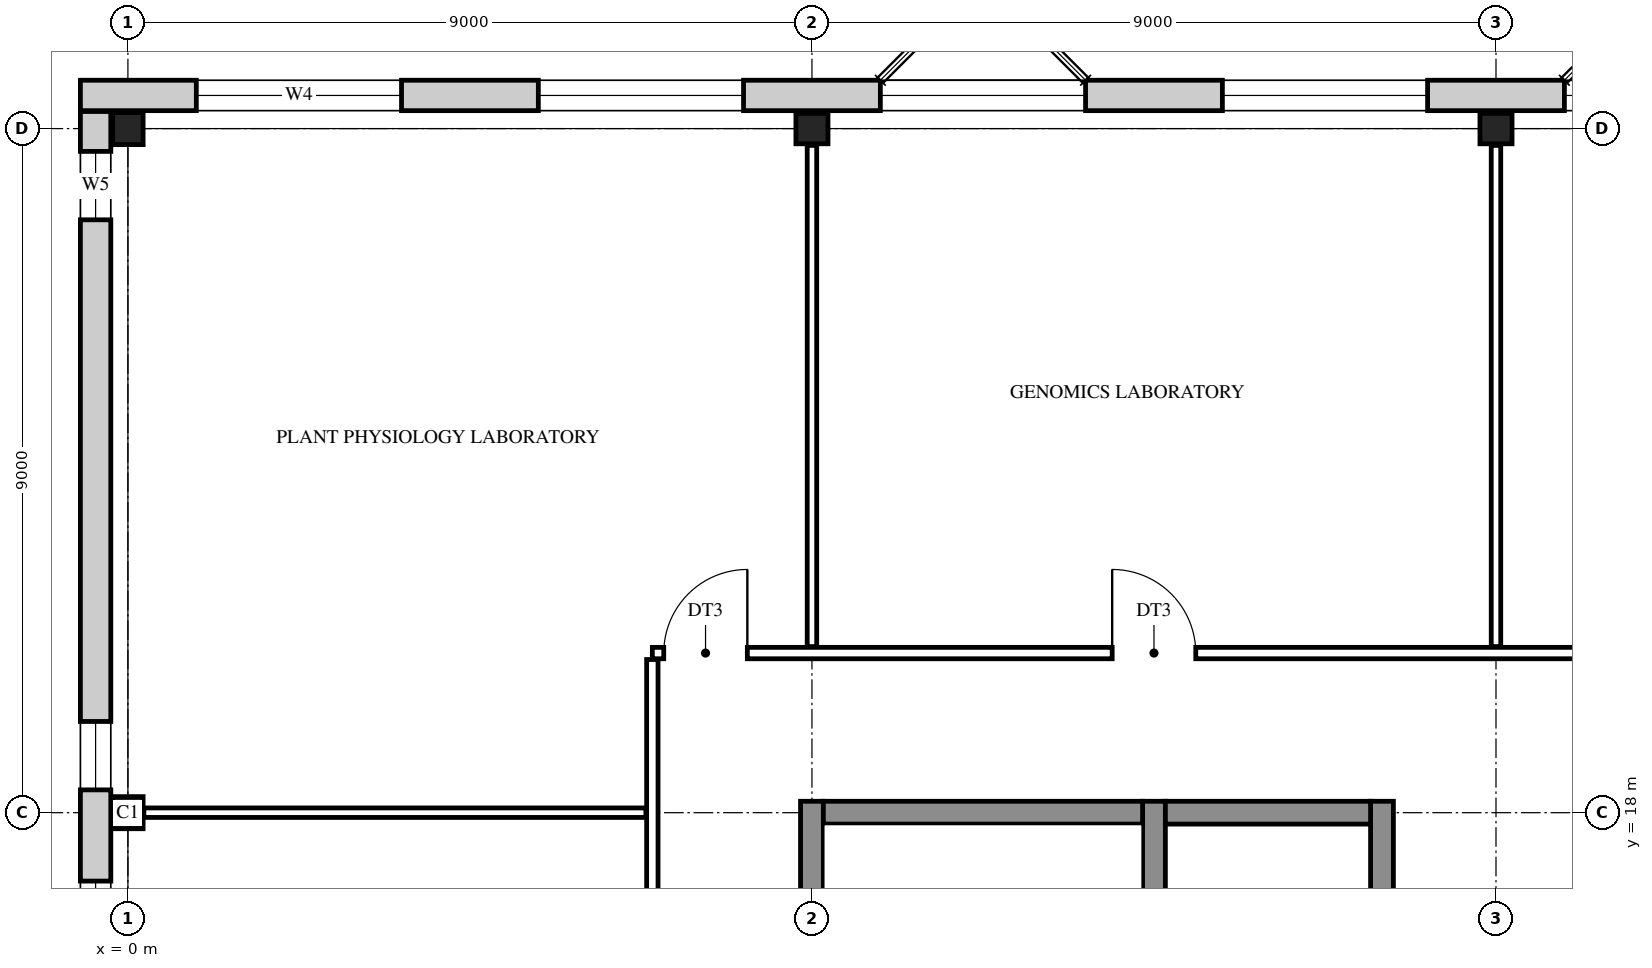
"""IFC4 building model, lengths in metres.
Left out: names, types, materials, properties, quantities, classifications, styles, units other than length and angle.
Written with IfcOpenShell. Run it as: python <this file> out.ifc"""

import sys

from ifc_helpers import new_model, si_unit, direction, frame, frame_2d, origin, origin_2d, place, context, subcontext, project, spatial, rectangle, i_section, extrude, element, fill, save


model = new_model("IFC4")
c1 = context("Model", 3, precision=1e-05, world=origin(), true_north=direction((0.0, 1.0)))
c2 = subcontext(c1, "Body", "Model", "MODEL_VIEW")
j1 = project(units=[si_unit("LENGTHUNIT", "METRE"), si_unit("PLANEANGLEUNIT", "RADIAN")], contexts=[c1])
p1 = place(None, origin())
s1 = spatial("IfcSite", under=j1, at=p1, CompositionType="ELEMENT")
p2 = place(p1, origin())
s2 = spatial("IfcBuilding", under=s1, at=p2, CompositionType="ELEMENT")
p3 = place(p2, frame((0.0, 0.0, 15.0)))
s3 = spatial("IfcBuildingStorey", under=s2, at=p3, CompositionType="ELEMENT", Elevation=15.0)
for number, where, z_axis, x_axis in (
    (1, (0.0, 18.0, 0.0), (0.0, 0.0, 1.0), (1.0, 0.0, 0.0)),
    (2, (0.0, 27.0, 0.0), (0.0, 0.0, 1.0), (1.0, 0.0, 0.0)),
    (3, (9.0, 27.0, 0.0), (0.0, 0.0, 1.0), (0.0, 1.0, 0.0)),
    (4, (18.0, 27.0, 0.0), (0.0, 0.0, 1.0), (0.0, 1.0, 0.0)),
):
    element("IfcColumn", number, at=place(p3, frame(where, z_axis=z_axis, x_axis=x_axis)), inside=s3, PredefinedType="COLUMN", context=c2, shape_type="SweptSolid", body=[
        extrude(i_section(OverallWidth=0.4, OverallDepth=0.422, WebThickness=0.028, FlangeThickness=0.036, at=origin_2d()), origin(), (0.0, 0.0, 1.0), 4.2),
    ])
for number, where, z_axis, x_axis in (
    (5, (9.0, 8.85, 0.0), (0.0, 0.0, 1.0), (0.0, 1.0, 0.0)),
    (6, (13.5, 8.85, 0.0), (0.0, 0.0, 1.0), (0.0, 1.0, 0.0)),
):
    element("IfcWall", number, at=place(p3, frame(where, z_axis=z_axis, x_axis=x_axis)), inside=s3, PredefinedType="SHEAR", context=c2, shape_type="SweptSolid", body=[
        extrude(rectangle(XDim=9.3, YDim=0.3, at=frame_2d((4.65, 0.0))), origin(), (0.0, 0.0, 1.0), 4.2),
    ])
p4 = place(p3, frame((16.5, 8.85, 0.0), z_axis=(0.0, 0.0, 1.0), x_axis=(0.0, 1.0, 0.0)))
e7 = element("IfcWall", 7, at=p4, inside=s3, PredefinedType="SHEAR", context=c2, shape_type="SweptSolid", body=[
    extrude(rectangle(XDim=9.3, YDim=0.3, at=frame_2d((4.65, 0.0))), origin(), (0.0, 0.0, 1.0), 4.2),
])
p5 = place(p4, frame((1.1, 0.0, 0.0)))
e8 = element("IfcOpeningElement", 8, at=p5, cuts=e7, PredefinedType="OPENING", context=c2, shape_type="SweptSolid", body=[
    extrude(rectangle(XDim=1.1, YDim=2.1, at=frame_2d((0.55, 1.05))), frame((0.0, 0.16, 0.0), z_axis=(0.0, -1.0, 0.0), x_axis=(1.0, 0.0, 0.0)), (0.0, 0.0, 1.0), 0.32),
])
p6 = place(p4, frame((4.1, 0.0, 0.0)))
e9 = element("IfcOpeningElement", 9, at=p6, cuts=e7, PredefinedType="OPENING", context=c2, shape_type="SweptSolid", body=[
    extrude(rectangle(XDim=1.1, YDim=2.1, at=frame_2d((0.55, 1.05))), frame((0.0, 0.16, 0.0), z_axis=(0.0, -1.0, 0.0), x_axis=(1.0, 0.0, 0.0)), (0.0, 0.0, 1.0), 0.32),
])
p7 = place(p3, frame((9.15, 18.0, 0.0), z_axis=(0.0, 0.0, 1.0), x_axis=(1.0, 0.0, 0.0)))
e10 = element("IfcWall", 10, at=p7, inside=s3, PredefinedType="SHEAR", context=c2, shape_type="SweptSolid", body=[
    extrude(rectangle(XDim=4.2, YDim=0.3, at=frame_2d((2.1, 0.0))), origin(), (0.0, 0.0, 1.0), 4.2),
])
p8 = place(p3, frame((13.65, 18.0, 0.0), z_axis=(0.0, 0.0, 1.0), x_axis=(1.0, 0.0, 0.0)))
e11 = element("IfcWall", 11, at=p8, inside=s3, PredefinedType="SHEAR", context=c2, shape_type="SweptSolid", body=[
    extrude(rectangle(XDim=2.7, YDim=0.3, at=frame_2d((1.35, 0.0))), origin(), (0.0, 0.0, 1.0), 4.2),
])
p9 = place(p3, frame((-0.425, -0.225, 0.0), z_axis=(0.0, 0.0, 1.0), x_axis=(0.0, 1.0, 0.0)))
e12 = element("IfcWall", 12, at=p9, inside=s3, PredefinedType="STANDARD", context=c2, shape_type="SweptSolid", body=[
    extrude(rectangle(XDim=27.45, YDim=0.4, at=frame_2d((13.725, 0.0))), origin(), (0.0, 0.0, 1.0), 4.2),
])
p10 = place(p9, frame((0.525, 0.0, 0.9)))
e13 = element("IfcOpeningElement", 13, at=p10, cuts=e12, PredefinedType="OPENING", context=c2, shape_type="SweptSolid", body=[
    extrude(rectangle(XDim=0.9, YDim=2.0, at=frame_2d((0.45, 1.0))), frame((0.0, 0.21, 0.0), z_axis=(0.0, -1.0, 0.0), x_axis=(1.0, 0.0, 0.0)), (0.0, 0.0, 1.0), 0.42),
])
p11 = place(p9, frame((8.025, 0.0, 0.9)))
e14 = element("IfcOpeningElement", 14, at=p11, cuts=e12, PredefinedType="OPENING", context=c2, shape_type="SweptSolid", body=[
    extrude(rectangle(XDim=0.9, YDim=2.0, at=frame_2d((0.45, 1.0))), frame((0.0, 0.21, 0.0), z_axis=(0.0, -1.0, 0.0), x_axis=(1.0, 0.0, 0.0)), (0.0, 0.0, 1.0), 0.42),
])
p12 = place(p9, frame((10.125, 0.0, 0.9)))
e15 = element("IfcOpeningElement", 15, at=p12, cuts=e12, PredefinedType="OPENING", context=c2, shape_type="SweptSolid", body=[
    extrude(rectangle(XDim=2.7, YDim=2.5, at=frame_2d((1.35, 1.25))), frame((0.0, 0.21, 0.0), z_axis=(0.0, -1.0, 0.0), x_axis=(1.0, 0.0, 0.0)), (0.0, 0.0, 1.0), 0.42),
])
p13 = place(p9, frame((14.625, 0.0, 0.9)))
e16 = element("IfcOpeningElement", 16, at=p13, cuts=e12, PredefinedType="OPENING", context=c2, shape_type="SweptSolid", body=[
    extrude(rectangle(XDim=2.7, YDim=2.5, at=frame_2d((1.35, 1.25))), frame((0.0, 0.21, 0.0), z_axis=(0.0, -1.0, 0.0), x_axis=(1.0, 0.0, 0.0)), (0.0, 0.0, 1.0), 0.42),
])
p14 = place(p9, frame((18.525, 0.0, 0.9)))
e17 = element("IfcOpeningElement", 17, at=p14, cuts=e12, PredefinedType="OPENING", context=c2, shape_type="SweptSolid", body=[
    extrude(rectangle(XDim=0.9, YDim=2.0, at=frame_2d((0.45, 1.0))), frame((0.0, 0.21, 0.0), z_axis=(0.0, -1.0, 0.0), x_axis=(1.0, 0.0, 0.0)), (0.0, 0.0, 1.0), 0.42),
])
p15 = place(p9, frame((26.025, 0.0, 0.9)))
e18 = element("IfcOpeningElement", 18, at=p15, cuts=e12, PredefinedType="OPENING", context=c2, shape_type="SweptSolid", body=[
    extrude(rectangle(XDim=0.9, YDim=2.0, at=frame_2d((0.45, 1.0))), frame((0.0, 0.21, 0.0), z_axis=(0.0, -1.0, 0.0), x_axis=(1.0, 0.0, 0.0)), (0.0, 0.0, 1.0), 0.42),
])
p16 = place(p3, frame((-0.625, 27.436, 0.0), z_axis=(0.0, 0.0, 1.0), x_axis=(1.0, 0.0, 0.0)))
e19 = element("IfcWall", 19, at=p16, inside=s3, PredefinedType="STANDARD", context=c2, shape_type="SweptSolid", body=[
    extrude(rectangle(XDim=32.75, YDim=0.4, at=frame_2d((16.375, 0.0))), origin(), (0.0, 0.0, 1.0), 4.2),
])
p17 = place(p16, frame((1.525, 0.0, 0.9)))
e20 = element("IfcOpeningElement", 20, at=p17, cuts=e19, PredefinedType="OPENING", context=c2, shape_type="SweptSolid", body=[
    extrude(rectangle(XDim=2.7, YDim=2.5, at=frame_2d((1.35, 1.25))), frame((0.0, 0.21, 0.0), z_axis=(0.0, -1.0, 0.0), x_axis=(1.0, 0.0, 0.0)), (0.0, 0.0, 1.0), 0.42),
])
p18 = place(p16, frame((6.025, 0.0, 0.9)))
e21 = element("IfcOpeningElement", 21, at=p18, cuts=e19, PredefinedType="OPENING", context=c2, shape_type="SweptSolid", body=[
    extrude(rectangle(XDim=2.7, YDim=2.5, at=frame_2d((1.35, 1.25))), frame((0.0, 0.21, 0.0), z_axis=(0.0, -1.0, 0.0), x_axis=(1.0, 0.0, 0.0)), (0.0, 0.0, 1.0), 0.42),
])
p19 = place(p16, frame((10.525, 0.0, 0.9)))
e22 = element("IfcOpeningElement", 22, at=p19, cuts=e19, PredefinedType="OPENING", context=c2, shape_type="SweptSolid", body=[
    extrude(rectangle(XDim=2.7, YDim=2.5, at=frame_2d((1.35, 1.25))), frame((0.0, 0.21, 0.0), z_axis=(0.0, -1.0, 0.0), x_axis=(1.0, 0.0, 0.0)), (0.0, 0.0, 1.0), 0.42),
])
p20 = place(p16, frame((15.025, 0.0, 0.9)))
e23 = element("IfcOpeningElement", 23, at=p20, cuts=e19, PredefinedType="OPENING", context=c2, shape_type="SweptSolid", body=[
    extrude(rectangle(XDim=2.7, YDim=2.5, at=frame_2d((1.35, 1.25))), frame((0.0, 0.21, 0.0), z_axis=(0.0, -1.0, 0.0), x_axis=(1.0, 0.0, 0.0)), (0.0, 0.0, 1.0), 0.42),
])
p21 = place(p16, frame((19.525, 0.0, 0.9)))
e24 = element("IfcOpeningElement", 24, at=p21, cuts=e19, PredefinedType="OPENING", context=c2, shape_type="SweptSolid", body=[
    extrude(rectangle(XDim=2.7, YDim=2.5, at=frame_2d((1.35, 1.25))), frame((0.0, 0.21, 0.0), z_axis=(0.0, -1.0, 0.0), x_axis=(1.0, 0.0, 0.0)), (0.0, 0.0, 1.0), 0.42),
])
p22 = place(p16, frame((24.025, 0.0, 0.9)))
e25 = element("IfcOpeningElement", 25, at=p22, cuts=e19, PredefinedType="OPENING", context=c2, shape_type="SweptSolid", body=[
    extrude(rectangle(XDim=2.7, YDim=2.5, at=frame_2d((1.35, 1.25))), frame((0.0, 0.21, 0.0), z_axis=(0.0, -1.0, 0.0), x_axis=(1.0, 0.0, 0.0)), (0.0, 0.0, 1.0), 0.42),
])
p23 = place(p16, frame((28.525, 0.0, 0.9)))
e26 = element("IfcOpeningElement", 26, at=p23, cuts=e19, PredefinedType="OPENING", context=c2, shape_type="SweptSolid", body=[
    extrude(rectangle(XDim=2.7, YDim=2.5, at=frame_2d((1.35, 1.25))), frame((0.0, 0.21, 0.0), z_axis=(0.0, -1.0, 0.0), x_axis=(1.0, 0.0, 0.0)), (0.0, 0.0, 1.0), 0.42),
])
p24 = place(p3, frame((6.9, 6.985, 0.0), z_axis=(0.0, 0.0, 1.0), x_axis=(0.0, 1.0, 0.0)))
e27 = element("IfcWall", 27, at=p24, inside=s3, PredefinedType="PARTITIONING", context=c2, shape_type="SweptSolid", body=[
    extrude(rectangle(XDim=13.03, YDim=0.15, at=frame_2d((6.515, 0.0))), origin(), (0.0, 0.0, 1.0), 3.537),
])
p25 = place(p24, frame((3.765, 0.0, 0.0)))
e28 = element("IfcOpeningElement", 28, at=p25, cuts=e27, PredefinedType="OPENING", context=c2, shape_type="SweptSolid", body=[
    extrude(rectangle(XDim=1.0, YDim=2.1, at=frame_2d((0.5, 1.05))), frame((0.0, 0.085, 0.0), z_axis=(0.0, -1.0, 0.0), x_axis=(1.0, 0.0, 0.0)), (0.0, 0.0, 1.0), 0.17),
])
p26 = place(p24, frame((8.265, 0.0, 0.0)))
e29 = element("IfcOpeningElement", 29, at=p26, cuts=e27, PredefinedType="OPENING", context=c2, shape_type="SweptSolid", body=[
    extrude(rectangle(XDim=1.0, YDim=2.1, at=frame_2d((0.5, 1.05))), frame((0.0, 0.085, 0.0), z_axis=(0.0, -1.0, 0.0), x_axis=(1.0, 0.0, 0.0)), (0.0, 0.0, 1.0), 0.17),
])
for number, where, z_axis, x_axis in (
    (30, (9.0, 20.185, 0.0), (0.0, 0.0, 1.0), (0.0, 1.0, 0.0)),
    (31, (18.0, 20.185, 0.0), (0.0, 0.0, 1.0), (0.0, 1.0, 0.0)),
):
    element("IfcWall", number, at=place(p3, frame(where, z_axis=z_axis, x_axis=x_axis)), inside=s3, PredefinedType="PARTITIONING", context=c2, shape_type="SweptSolid", body=[
        extrude(rectangle(XDim=6.594, YDim=0.125, at=frame_2d((3.297, 0.0))), origin(), (0.0, 0.0, 1.0), 3.537),
    ])
p27 = place(p3, frame((0.21, 18.0, 0.0), z_axis=(0.0, 0.0, 1.0), x_axis=(1.0, 0.0, 0.0)))
e32 = element("IfcWall", 32, at=p27, inside=s3, PredefinedType="PARTITIONING", context=c2, shape_type="SweptSolid", body=[
    extrude(rectangle(XDim=6.605, YDim=0.125, at=frame_2d((3.302, 0.0))), origin(), (0.0, 0.0, 1.0), 3.537),
])
p28 = place(p3, frame((6.9, 20.1, 0.0), z_axis=(0.0, 0.0, 1.0), x_axis=(1.0, 0.0, 0.0)))
e33 = element("IfcWall", 33, at=p28, inside=s3, PredefinedType="PARTITIONING", context=c2, shape_type="SweptSolid", body=[
    extrude(rectangle(XDim=20.1, YDim=0.15, at=frame_2d((10.05, 0.0))), origin(), (0.0, 0.0, 1.0), 3.537),
])
p29 = place(p28, frame((0.15, 0.0, 0.0)))
e34 = element("IfcOpeningElement", 34, at=p29, cuts=e33, PredefinedType="OPENING", context=c2, shape_type="SweptSolid", body=[
    extrude(rectangle(XDim=1.1, YDim=2.1, at=frame_2d((0.55, 1.05))), frame((0.0, 0.085, 0.0), z_axis=(0.0, -1.0, 0.0), x_axis=(1.0, 0.0, 0.0)), (0.0, 0.0, 1.0), 0.17),
])
p30 = place(p28, frame((6.05, 0.0, 0.0)))
e35 = element("IfcOpeningElement", 35, at=p30, cuts=e33, PredefinedType="OPENING", context=c2, shape_type="SweptSolid", body=[
    extrude(rectangle(XDim=1.1, YDim=2.1, at=frame_2d((0.55, 1.05))), frame((0.0, 0.085, 0.0), z_axis=(0.0, -1.0, 0.0), x_axis=(1.0, 0.0, 0.0)), (0.0, 0.0, 1.0), 0.17),
])
p31 = place(p28, frame((16.25, 0.0, 0.0)))
e36 = element("IfcOpeningElement", 36, at=p31, cuts=e33, PredefinedType="OPENING", context=c2, shape_type="SweptSolid", body=[
    extrude(rectangle(XDim=1.1, YDim=2.1, at=frame_2d((0.55, 1.05))), frame((0.0, 0.085, 0.0), z_axis=(0.0, -1.0, 0.0), x_axis=(1.0, 0.0, 0.0)), (0.0, 0.0, 1.0), 0.17),
])
p32 = place(p13, origin())
e37 = element("IfcWindow", 37, at=p32, inside=s3, PartitioningType="SINGLE_PANEL", PredefinedType="WINDOW", context=c2, shape_type="SweptSolid", body=[
    extrude(rectangle(XDim=2.7, YDim=2.5, at=frame_2d((1.35, 1.25))), frame((0.0, 0.03, 0.0), z_axis=(0.0, -1.0, 0.0), x_axis=(1.0, 0.0, 0.0)), (0.0, 0.0, 1.0), 0.06),
])
fill(e16, e37)
p33 = place(p14, origin())
e38 = element("IfcWindow", 38, at=p33, inside=s3, PartitioningType="SINGLE_PANEL", PredefinedType="WINDOW", context=c2, shape_type="SweptSolid", body=[
    extrude(rectangle(XDim=0.9, YDim=2.0, at=frame_2d((0.45, 1.0))), frame((0.0, 0.03, 0.0), z_axis=(0.0, -1.0, 0.0), x_axis=(1.0, 0.0, 0.0)), (0.0, 0.0, 1.0), 0.06),
])
fill(e17, e38)
p34 = place(p15, origin())
e39 = element("IfcWindow", 39, at=p34, inside=s3, PartitioningType="SINGLE_PANEL", PredefinedType="WINDOW", context=c2, shape_type="SweptSolid", body=[
    extrude(rectangle(XDim=0.9, YDim=2.0, at=frame_2d((0.45, 1.0))), frame((0.0, 0.03, 0.0), z_axis=(0.0, -1.0, 0.0), x_axis=(1.0, 0.0, 0.0)), (0.0, 0.0, 1.0), 0.06),
])
fill(e18, e39)
p35 = place(p17, origin())
e40 = element("IfcWindow", 40, at=p35, inside=s3, PartitioningType="SINGLE_PANEL", PredefinedType="WINDOW", context=c2, shape_type="SweptSolid", body=[
    extrude(rectangle(XDim=2.7, YDim=2.5, at=frame_2d((1.35, 1.25))), frame((0.0, 0.03, 0.0), z_axis=(0.0, -1.0, 0.0), x_axis=(1.0, 0.0, 0.0)), (0.0, 0.0, 1.0), 0.06),
])
fill(e20, e40)
p36 = place(p18, origin())
e41 = element("IfcWindow", 41, at=p36, inside=s3, PartitioningType="SINGLE_PANEL", PredefinedType="WINDOW", context=c2, shape_type="SweptSolid", body=[
    extrude(rectangle(XDim=2.7, YDim=2.5, at=frame_2d((1.35, 1.25))), frame((0.0, 0.03, 0.0), z_axis=(0.0, -1.0, 0.0), x_axis=(1.0, 0.0, 0.0)), (0.0, 0.0, 1.0), 0.06),
])
fill(e21, e41)
p37 = place(p19, origin())
e42 = element("IfcWindow", 42, at=p37, inside=s3, PartitioningType="SINGLE_PANEL", PredefinedType="WINDOW", context=c2, shape_type="SweptSolid", body=[
    extrude(rectangle(XDim=2.7, YDim=2.5, at=frame_2d((1.35, 1.25))), frame((0.0, 0.03, 0.0), z_axis=(0.0, -1.0, 0.0), x_axis=(1.0, 0.0, 0.0)), (0.0, 0.0, 1.0), 0.06),
])
fill(e22, e42)
p38 = place(p20, origin())
e43 = element("IfcWindow", 43, at=p38, inside=s3, PartitioningType="SINGLE_PANEL", PredefinedType="WINDOW", context=c2, shape_type="SweptSolid", body=[
    extrude(rectangle(XDim=2.7, YDim=2.5, at=frame_2d((1.35, 1.25))), frame((0.0, 0.03, 0.0), z_axis=(0.0, -1.0, 0.0), x_axis=(1.0, 0.0, 0.0)), (0.0, 0.0, 1.0), 0.06),
])
fill(e23, e43)
p39 = place(p21, origin())
e44 = element("IfcWindow", 44, at=p39, inside=s3, PartitioningType="SINGLE_PANEL", PredefinedType="WINDOW", context=c2, shape_type="SweptSolid", body=[
    extrude(rectangle(XDim=2.7, YDim=2.5, at=frame_2d((1.35, 1.25))), frame((0.0, 0.03, 0.0), z_axis=(0.0, -1.0, 0.0), x_axis=(1.0, 0.0, 0.0)), (0.0, 0.0, 1.0), 0.06),
])
fill(e24, e44)
p40 = place(p29, origin())
e45 = element("IfcDoor", 45, at=p40, inside=s3, OperationType="SINGLE_SWING_RIGHT", PredefinedType="DOOR", context=c2, shape_type="SweptSolid", body=[
    extrude(rectangle(XDim=1.1, YDim=2.1, at=frame_2d((0.55, 1.05))), frame((0.0, 0.025, 0.0), z_axis=(0.0, -1.0, 0.0), x_axis=(1.0, 0.0, 0.0)), (0.0, 0.0, 1.0), 0.05),
])
fill(e34, e45)
p41 = place(p30, origin())
e46 = element("IfcDoor", 46, at=p41, inside=s3, OperationType="SINGLE_SWING_LEFT", PredefinedType="DOOR", context=c2, shape_type="SweptSolid", body=[
    extrude(rectangle(XDim=1.1, YDim=2.1, at=frame_2d((0.55, 1.05))), frame((0.0, 0.025, 0.0), z_axis=(0.0, -1.0, 0.0), x_axis=(1.0, 0.0, 0.0)), (0.0, 0.0, 1.0), 0.05),
])
fill(e35, e46)
save(model, sys.argv[1])
